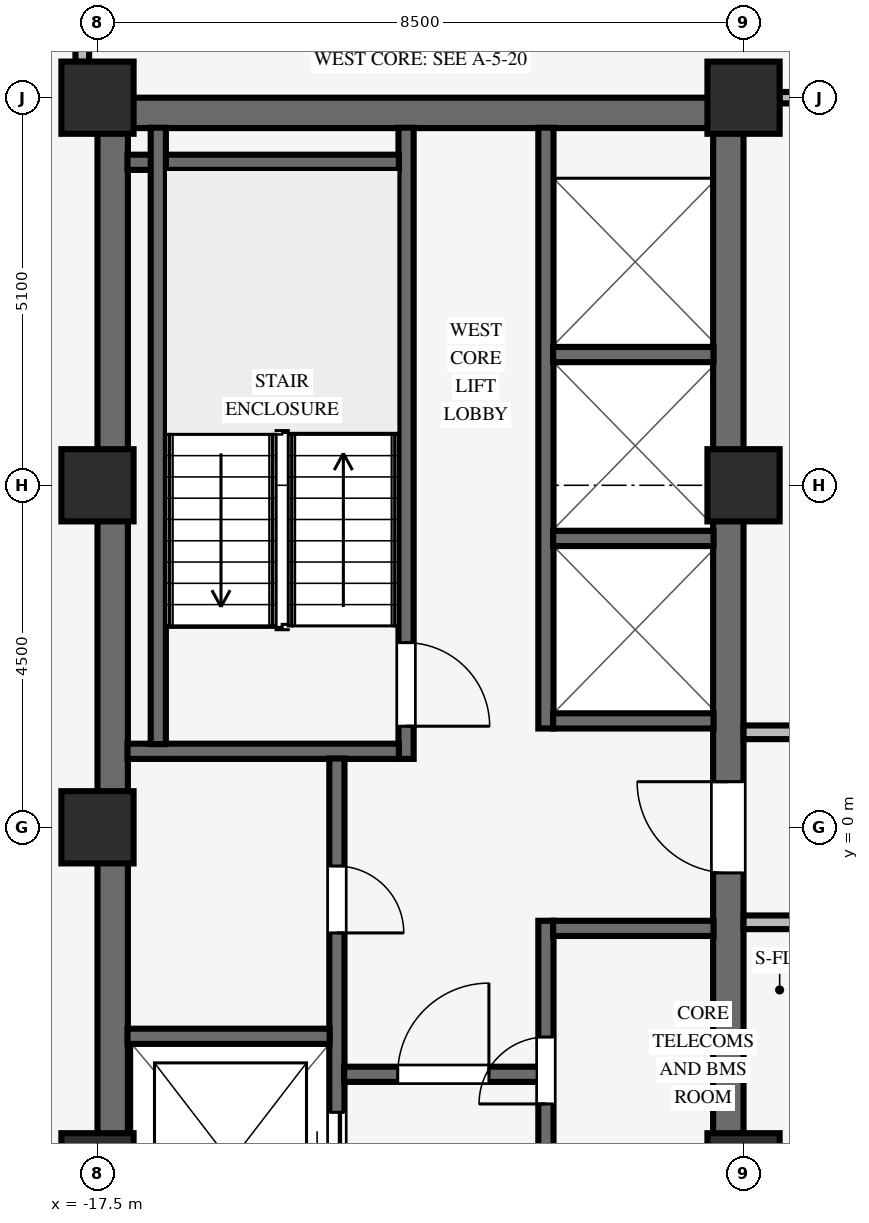
"""IFC4 building model, lengths in metres.
Left out: names, types, materials, properties, quantities, classifications, styles, units other than length and angle.
Written with IfcOpenShell. Run it as: python <this file> out.ifc"""

import sys

from ifc_helpers import new_model, si_unit, direction, frame, frame_2d, origin, origin_2d, place, context, subcontext, project, spatial, rectangle, extrude, source, transform, mapped, element, fill, save


model = new_model("IFC4")
c1 = context("Model", 3, precision=1e-05, world=origin(), true_north=direction((0.0, 1.0)))
c2 = subcontext(c1, "Body", "Model", "MODEL_VIEW")
j1 = project(units=[si_unit("LENGTHUNIT", "METRE"), si_unit("PLANEANGLEUNIT", "RADIAN")], contexts=[c1])
p1 = place(None, origin())
s1 = spatial("IfcSite", under=j1, at=p1, CompositionType="ELEMENT")
p2 = place(p1, origin())
s2 = spatial("IfcBuilding", under=s1, at=p2, CompositionType="ELEMENT")
p3 = place(p2, frame((0.0, 0.0, 174.95)))
s3 = spatial("IfcBuildingStorey", under=s2, at=p3, CompositionType="ELEMENT", Elevation=174.95)
p4 = place(p3, frame((-17.5, 9.4, 0.0), z_axis=(0.0, 0.0, 1.0), x_axis=(1.0, 0.0, 0.0)))
e1 = element("IfcWall", 1, at=p4, inside=s3, PredefinedType="SHEAR", context=c2, shape_type="SweptSolid", body=[
    extrude(rectangle(XDim=8.5, YDim=0.4, at=frame_2d((4.25, 0.0))), origin(), (0.0, 0.0, 1.0), 3.37),
])
p5 = place(p3, frame((-17.3, -9.205, 0.0), z_axis=(0.0, 0.0, 1.0), x_axis=(0.0, 1.0, 0.0)))
e2 = element("IfcWall", 2, at=p5, inside=s3, PredefinedType="SHEAR", context=c2, shape_type="SweptSolid", body=[
    extrude(rectangle(XDim=18.41, YDim=0.4, at=frame_2d((9.205, 0.0))), origin(), (0.0, 0.0, 1.0), 3.37),
])
p6 = place(p3, frame((-9.2, -9.205, 0.0), z_axis=(0.0, 0.0, 1.0), x_axis=(0.0, 1.0, 0.0)))
e3 = element("IfcWall", 3, at=p6, inside=s3, PredefinedType="SHEAR", context=c2, shape_type="SweptSolid", body=[
    extrude(rectangle(XDim=18.41, YDim=0.4, at=frame_2d((9.205, 0.0))), origin(), (0.0, 0.0, 1.0), 3.37),
])
p7 = place(p6, frame((8.605, 0.0, 0.0)))
e4 = element("IfcOpeningElement", 4, at=p7, cuts=e3, PredefinedType="OPENING", context=c2, shape_type="SweptSolid", body=[
    extrude(rectangle(XDim=1.2, YDim=2.15, at=frame_2d((0.6, 1.075))), frame((0.0, 0.21, 0.0), z_axis=(0.0, -1.0, 0.0), x_axis=(1.0, 0.0, 0.0)), (0.0, 0.0, 1.0), 0.42),
])
for number, where, z_axis, x_axis in (
    (5, (-17.5, -4.5, 0.0), (0.0, 0.0, 1.0), (1.0, 0.0, 0.0)),
    (6, (-17.5, 4.5, 0.0), (0.0, 0.0, 1.0), (1.0, 0.0, 0.0)),
    (7, (-17.5, 9.6, 0.0), (0.0, 0.0, 1.0), (1.0, 0.0, 0.0)),
    (8, (-9.0, -4.5, 0.0), (0.0, 0.0, 1.0), (1.0, 0.0, 0.0)),
    (9, (-9.0, 4.5, 0.0), (0.0, 0.0, 1.0), (1.0, 0.0, 0.0)),
    (10, (-9.0, 9.6, 0.0), (0.0, 0.0, 1.0), (1.0, 0.0, 0.0)),
    (11, (-17.5, 0.0, 0.0), (0.0, 0.0, 1.0), (1.0, 0.0, 0.0)),
):
    element("IfcColumn", number, at=place(p3, frame(where, z_axis=z_axis, x_axis=x_axis)), inside=s3, PredefinedType="COLUMN", context=c2, shape_type="SweptSolid", body=[
        extrude(rectangle(XDim=0.95, YDim=0.95, at=origin_2d()), origin(), (0.0, 0.0, 1.0), 3.37),
    ])
p8 = place(p3, frame((-13.44, 0.9, 0.0), z_axis=(0.0, 0.0, 1.0), x_axis=(0.0, 1.0, 0.0)))
e12 = element("IfcWall", 12, at=p8, inside=s3, PredefinedType="SHEAR", context=c2, shape_type="SweptSolid", body=[
    extrude(rectangle(XDim=8.305, YDim=0.2, at=frame_2d((4.153, 0.0))), origin(), (0.0, 0.0, 1.0), 3.37),
])
p9 = place(p8, frame((1.53, 0.0, 0.0), z_axis=(0.0, 0.0, 1.0), x_axis=(-1.0, 0.0, 0.0)))
e13 = element("IfcOpeningElement", 13, at=p9, cuts=e12, PredefinedType="OPENING", context=c2, shape_type="SweptSolid", body=[
    extrude(rectangle(XDim=1.1, YDim=2.15, at=frame_2d((0.55, 1.075))), frame((0.0, 0.11, 0.0), z_axis=(0.0, -1.0, 0.0), x_axis=(1.0, 0.0, 0.0)), (0.0, 0.0, 1.0), 0.22),
])
for number, where, z_axis, x_axis in (
    (14, (-17.105, 1.0, 0.0), (0.0, 0.0, 1.0), (1.0, 0.0, 0.0)),
    (15, (-17.105, 8.75, 0.0), (0.0, 0.0, 1.0), (1.0, 0.0, 0.0)),
):
    element("IfcWall", number, at=place(p3, frame(where, z_axis=z_axis, x_axis=x_axis)), inside=s3, PredefinedType="SHEAR", context=c2, shape_type="SweptSolid", body=[
        extrude(rectangle(XDim=3.57, YDim=0.2, at=frame_2d((1.785, 0.0))), origin(), (0.0, 0.0, 1.0), 3.37),
    ])
p10 = place(p3, frame((-16.7, 1.095, 0.0), z_axis=(0.0, 0.0, 1.0), x_axis=(0.0, 1.0, 0.0)))
e16 = element("IfcWall", 16, at=p10, inside=s3, PredefinedType="SHEAR", context=c2, shape_type="SweptSolid", body=[
    extrude(rectangle(XDim=8.11, YDim=0.2, at=frame_2d((4.055, 0.0))), origin(), (0.0, 0.0, 1.0), 3.37),
])
p11 = place(p3, frame((-14.35, -6.2, 0.0), z_axis=(0.0, 0.0, 1.0), x_axis=(0.0, 1.0, 0.0)))
e17 = element("IfcWall", 17, at=p11, inside=s3, PredefinedType="SHEAR", context=c2, shape_type="SweptSolid", body=[
    extrude(rectangle(XDim=7.105, YDim=0.2, at=frame_2d((3.552, 0.0))), origin(), (0.0, 0.0, 1.0), 3.37),
])
p12 = place(p11, frame((5.69, 0.0, 0.0), z_axis=(0.0, 0.0, 1.0), x_axis=(-1.0, 0.0, 0.0)))
e18 = element("IfcOpeningElement", 18, at=p12, cuts=e17, PredefinedType="OPENING", context=c2, shape_type="SweptSolid", body=[
    extrude(rectangle(XDim=0.88, YDim=2.1, at=frame_2d((0.44, 1.05))), frame((0.0, 0.11, 0.0), z_axis=(0.0, -1.0, 0.0), x_axis=(1.0, 0.0, 0.0)), (0.0, 0.0, 1.0), 0.22),
])
p13 = place(p11, frame((1.15, 0.0, 0.0)))
e19 = element("IfcOpeningElement", 19, at=p13, cuts=e17, PredefinedType="OPENING", context=c2, shape_type="SweptSolid", body=[
    extrude(rectangle(XDim=1.3, YDim=2.2, at=frame_2d((0.65, 1.1))), frame((0.0, 0.11, 0.0), z_axis=(0.0, -1.0, 0.0), x_axis=(1.0, 0.0, 0.0)), (0.0, 0.0, 1.0), 0.22),
])
p14 = place(p3, frame((-17.105, -2.75, 0.0), z_axis=(0.0, 0.0, 1.0), x_axis=(1.0, 0.0, 0.0)))
e20 = element("IfcWall", 20, at=p14, inside=s3, PredefinedType="SHEAR", context=c2, shape_type="SweptSolid", body=[
    extrude(rectangle(XDim=2.66, YDim=0.2, at=frame_2d((1.33, 0.0))), origin(), (0.0, 0.0, 1.0), 3.37),
])
p15 = place(p3, frame((-11.6, -9.205, 0.0), z_axis=(0.0, 0.0, 1.0), x_axis=(0.0, 1.0, 0.0)))
e21 = element("IfcWall", 21, at=p15, inside=s3, PredefinedType="SHEAR", context=c2, shape_type="SweptSolid", body=[
    extrude(rectangle(XDim=7.975, YDim=0.2, at=frame_2d((3.988, 0.0))), origin(), (0.0, 0.0, 1.0), 3.37),
])
p16 = place(p15, frame((1.265, 0.0, 0.0)))
e22 = element("IfcOpeningElement", 22, at=p16, cuts=e21, PredefinedType="OPENING", context=c2, shape_type="SweptSolid", body=[
    extrude(rectangle(XDim=0.88, YDim=2.1, at=frame_2d((0.44, 1.05))), frame((0.0, 0.11, 0.0), z_axis=(0.0, -1.0, 0.0), x_axis=(1.0, 0.0, 0.0)), (0.0, 0.0, 1.0), 0.22),
])
p17 = place(p15, frame((5.565, 0.0, 0.0)))
e23 = element("IfcOpeningElement", 23, at=p17, cuts=e21, PredefinedType="OPENING", context=c2, shape_type="SweptSolid", body=[
    extrude(rectangle(XDim=0.88, YDim=2.1, at=frame_2d((0.44, 1.05))), frame((0.0, 0.11, 0.0), z_axis=(0.0, -1.0, 0.0), x_axis=(1.0, 0.0, 0.0)), (0.0, 0.0, 1.0), 0.22),
])
p18 = place(p3, frame((-14.255, -3.25, 0.0), z_axis=(0.0, 0.0, 1.0), x_axis=(1.0, 0.0, 0.0)))
e24 = element("IfcWall", 24, at=p18, inside=s3, PredefinedType="SHEAR", context=c2, shape_type="SweptSolid", body=[
    extrude(rectangle(XDim=2.56, YDim=0.2, at=frame_2d((1.28, 0.0))), origin(), (0.0, 0.0, 1.0), 3.37),
])
p19 = place(p18, frame((0.705, 0.0, 0.0)))
e25 = element("IfcOpeningElement", 25, at=p19, cuts=e24, PredefinedType="OPENING", context=c2, shape_type="SweptSolid", body=[
    extrude(rectangle(XDim=1.2, YDim=2.15, at=frame_2d((0.6, 1.075))), frame((0.0, 0.11, 0.0), z_axis=(0.0, -1.0, 0.0), x_axis=(1.0, 0.0, 0.0)), (0.0, 0.0, 1.0), 0.22),
])
p20 = place(p3, frame((-11.505, -1.33, 0.0), z_axis=(0.0, 0.0, 1.0), x_axis=(1.0, 0.0, 0.0)))
e26 = element("IfcWall", 26, at=p20, inside=s3, PredefinedType="SHEAR", context=c2, shape_type="SweptSolid", body=[
    extrude(rectangle(XDim=2.11, YDim=0.2, at=frame_2d((1.055, 0.0))), origin(), (0.0, 0.0, 1.0), 3.37),
])
p21 = place(p3, frame((-11.6, 1.3, 0.0), z_axis=(0.0, 0.0, 1.0), x_axis=(0.0, 1.0, 0.0)))
e27 = element("IfcWall", 27, at=p21, inside=s3, PredefinedType="SHEAR", context=c2, shape_type="SweptSolid", body=[
    extrude(rectangle(XDim=7.905, YDim=0.2, at=frame_2d((3.953, 0.0))), origin(), (0.0, 0.0, 1.0), 3.37),
])
for number, where, z_axis, x_axis in (
    (28, (-11.505, 1.4, 0.0), (0.0, 0.0, 1.0), (1.0, 0.0, 0.0)),
    (29, (-11.505, 3.8, 0.0), (0.0, 0.0, 1.0), (1.0, 0.0, 0.0)),
    (30, (-11.505, 6.22, 0.0), (0.0, 0.0, 1.0), (1.0, 0.0, 0.0)),
):
    element("IfcWall", number, at=place(p3, frame(where, z_axis=z_axis, x_axis=x_axis)), inside=s3, PredefinedType="SHEAR", context=c2, shape_type="SweptSolid", body=[
        extrude(rectangle(XDim=2.11, YDim=0.2, at=frame_2d((1.055, 0.0))), origin(), (0.0, 0.0, 1.0), 3.37),
    ])
p22 = place(p3, frame((-9.0, -1.25, 0.0), z_axis=(0.0, 0.0, 1.0), x_axis=(1.0, 0.0, 0.0)))
e31 = element("IfcWall", 31, at=p22, inside=s3, PredefinedType="PARTITIONING", context=c2, shape_type="SweptSolid", body=[
    extrude(rectangle(XDim=15.6, YDim=0.18, at=frame_2d((7.8, 0.0))), origin(), (0.0, 0.0, 1.0), 3.36),
])
p23 = place(p22, frame((3.32, 0.0, 0.0)))
e32 = element("IfcOpeningElement", 32, at=p23, cuts=e31, PredefinedType="OPENING", context=c2, shape_type="SweptSolid", body=[
    extrude(rectangle(XDim=0.96, YDim=2.1, at=frame_2d((0.48, 1.05))), frame((0.0, 0.1, 0.0), z_axis=(0.0, -1.0, 0.0), x_axis=(1.0, 0.0, 0.0)), (0.0, 0.0, 1.0), 0.2),
])
p24 = place(p3, frame((-9.0, 1.25, 0.0), z_axis=(0.0, 0.0, 1.0), x_axis=(1.0, 0.0, 0.0)))
e33 = element("IfcWall", 33, at=p24, inside=s3, PredefinedType="PARTITIONING", context=c2, shape_type="SweptSolid", body=[
    extrude(rectangle(XDim=15.6, YDim=0.18, at=frame_2d((7.8, 0.0))), origin(), (0.0, 0.0, 1.0), 3.36),
])
p25 = place(p24, frame((7.32, 0.0, 0.0)))
e34 = element("IfcOpeningElement", 34, at=p25, cuts=e33, PredefinedType="OPENING", context=c2, shape_type="SweptSolid", body=[
    extrude(rectangle(XDim=0.96, YDim=2.1, at=frame_2d((0.48, 1.05))), frame((0.0, 0.1, 0.0), z_axis=(0.0, -1.0, 0.0), x_axis=(1.0, 0.0, 0.0)), (0.0, 0.0, 1.0), 0.2),
])
p26 = place(p3, frame((-8.529, 9.6, 0.0), z_axis=(0.0, 0.0, 1.0), x_axis=(1.0, 0.0, 0.0)))
e35 = element("IfcWall", 35, at=p26, inside=s3, PredefinedType="PARTITIONING", context=c2, shape_type="SweptSolid", body=[
    extrude(rectangle(XDim=8.378, YDim=0.15, at=frame_2d((4.189, 0.0))), origin(), (0.0, 0.0, 1.0), 2.405),
])
p27 = place(p3, frame((-17.7, 10.071, 0.0), z_axis=(0.0, 0.0, 1.0), x_axis=(0.0, 1.0, 0.0)))
e36 = element("IfcWall", 36, at=p27, inside=s3, PredefinedType="PARTITIONING", context=c2, shape_type="SweptSolid", body=[
    extrude(rectangle(XDim=3.343, YDim=0.18, at=frame_2d((1.671, 0.0))), origin(), (0.0, 0.0, 1.0), 2.816),
])
m1 = source(origin(), c2, "Body", "SweptSolid", [
    extrude(rectangle(XDim=1.1, YDim=2.15, at=frame_2d((0.55, 1.075))), frame((0.0, 0.025, 0.0), z_axis=(0.0, -1.0, 0.0), x_axis=(1.0, 0.0, 0.0)), (0.0, 0.0, 1.0), 0.05),
])
p28 = place(p9, origin())
e37 = element("IfcDoor", 37, at=p28, inside=s3, OperationType="SINGLE_SWING_RIGHT", PredefinedType="DOOR", context=c2, shape_type="MappedRepresentation", body=[
    mapped(m1, transform((0.0, 0.0, 0.0), scale=1.0)),
])
fill(e13, e37)
m2 = source(origin(), c2, "Body", "SweptSolid", [
    extrude(rectangle(XDim=0.88, YDim=2.1, at=frame_2d((0.44, 1.05))), frame((0.0, 0.025, 0.0), z_axis=(0.0, -1.0, 0.0), x_axis=(1.0, 0.0, 0.0)), (0.0, 0.0, 1.0), 0.05),
])
p29 = place(p12, origin())
e38 = element("IfcDoor", 38, at=p29, inside=s3, OperationType="SINGLE_SWING_RIGHT", PredefinedType="DOOR", context=c2, shape_type="MappedRepresentation", body=[
    mapped(m2, transform((0.0, 0.0, 0.0), scale=1.0)),
])
fill(e18, e38)
m3 = source(origin(), c2, "Body", "SweptSolid", [
    extrude(rectangle(XDim=1.2, YDim=2.15, at=frame_2d((0.6, 1.075))), frame((0.0, 0.025, 0.0), z_axis=(0.0, -1.0, 0.0), x_axis=(1.0, 0.0, 0.0)), (0.0, 0.0, 1.0), 0.05),
])
p30 = place(p19, origin())
e39 = element("IfcDoor", 39, at=p30, inside=s3, OperationType="SINGLE_SWING_RIGHT", PredefinedType="DOOR", context=c2, shape_type="MappedRepresentation", body=[
    mapped(m3, transform((0.0, 0.0, 0.0), scale=1.0)),
])
fill(e25, e39)
p31 = place(p17, origin())
e40 = element("IfcDoor", 40, at=p31, inside=s3, OperationType="SINGLE_SWING_LEFT", PredefinedType="DOOR", context=c2, shape_type="MappedRepresentation", body=[
    mapped(m2, transform((0.0, 0.0, 0.0), scale=1.0)),
])
fill(e23, e40)
p32 = place(p7, origin())
e41 = element("IfcDoor", 41, at=p32, inside=s3, OperationType="SINGLE_SWING_RIGHT", PredefinedType="DOOR", context=c2, shape_type="MappedRepresentation", body=[
    mapped(m3, transform((0.0, 0.0, 0.0), scale=1.0)),
])
fill(e4, e41)
m4 = source(origin(), c2, "Body", "SweptSolid", [
    extrude(rectangle(XDim=1.3, YDim=2.2, at=frame_2d((0.65, 1.1))), frame((0.0, 0.025, 0.0), z_axis=(0.0, -1.0, 0.0), x_axis=(1.0, 0.0, 0.0)), (0.0, 0.0, 1.0), 0.05),
])
p33 = place(p13, origin())
e42 = element("IfcDoor", 42, at=p33, inside=s3, OperationType="DOUBLE_DOOR_SLIDING", PredefinedType="DOOR", context=c2, shape_type="MappedRepresentation", body=[
    mapped(m4, transform((0.0, 0.0, 0.0), scale=1.0)),
])
fill(e19, e42)
save(model, sys.argv[1])
